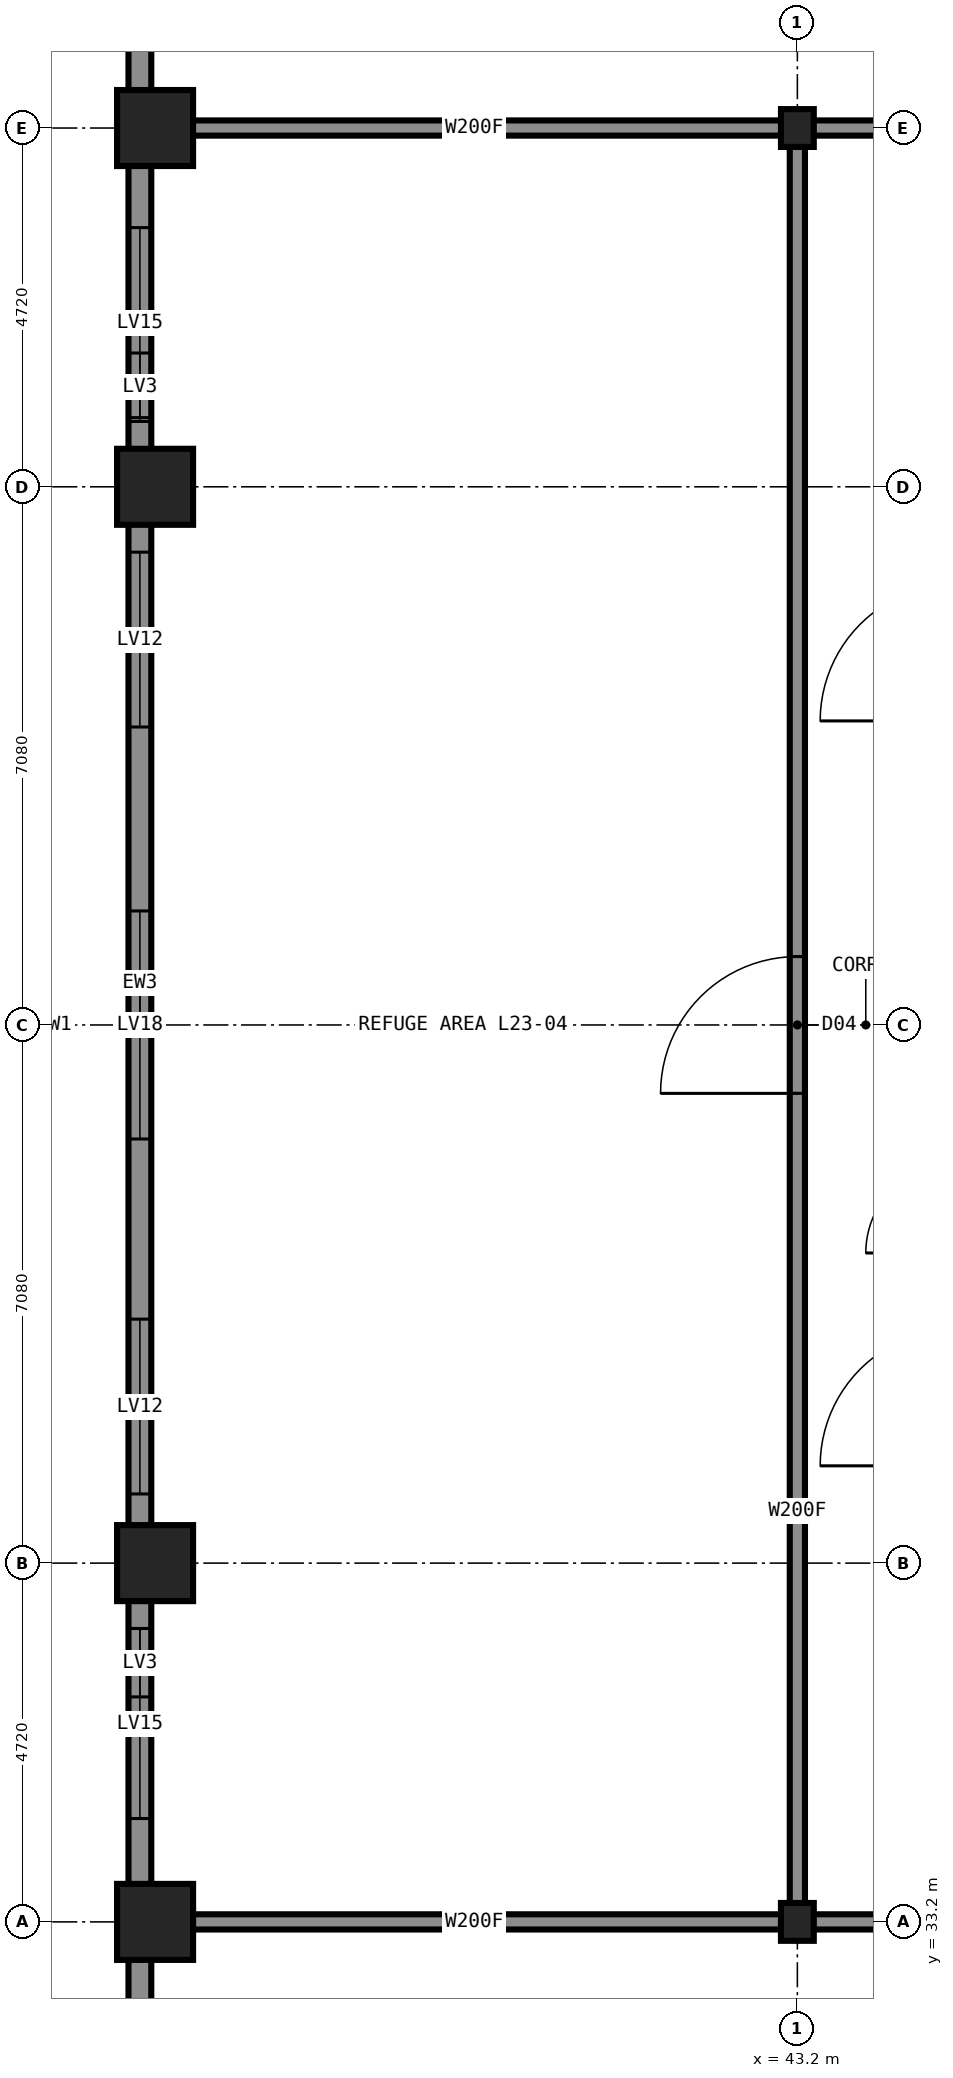
"""IFC4 building model, lengths in metres.
Left out: names, types, materials, properties, quantities, classifications, styles, units other than length and angle.
Written with IfcOpenShell. Run it as: python <this file> out.ifc"""

import sys

from ifc_helpers import new_model, si_unit, direction, frame, frame_2d, origin, origin_2d, place, context, subcontext, project, spatial, rectangle, hollow_rectangle, i_section, extrude, element, fill, save


model = new_model("IFC4")
c1 = context("Model", 3, precision=1e-05, world=origin(), true_north=direction((0.0, 1.0)))
c2 = subcontext(c1, "Body", "Model", "MODEL_VIEW")
j1 = project(units=[si_unit("LENGTHUNIT", "METRE"), si_unit("PLANEANGLEUNIT", "RADIAN")], contexts=[c1])
p1 = place(None, origin())
s1 = spatial("IfcSite", under=j1, at=p1, CompositionType="ELEMENT")
p2 = place(p1, origin())
s2 = spatial("IfcBuilding", under=s1, at=p2, CompositionType="ELEMENT")
p3 = place(p2, frame((0.0, 0.0, 88.0)))
s3 = spatial("IfcBuildingStorey", under=s2, at=p3, CompositionType="ELEMENT", Elevation=88.0)
for number, where, z_axis, x_axis in (
    (1, (34.75, 33.2, 0.0), (0.0, 0.0, 1.0), (1.0, 0.0, 0.0)),
    (2, (34.75, 37.92, 0.0), (0.0, 0.0, 1.0), (1.0, 0.0, 0.0)),
    (3, (34.75, 52.08, 0.0), (0.0, 0.0, 1.0), (1.0, 0.0, 0.0)),
    (4, (34.75, 56.8, 0.0), (0.0, 0.0, 1.0), (1.0, 0.0, 0.0)),
):
    element("IfcColumn", number, at=place(p3, frame(where, z_axis=z_axis, x_axis=x_axis)), inside=s3, PredefinedType="COLUMN", context=c2, shape_type="SweptSolid", body=[
        extrude(hollow_rectangle(XDim=1.0, YDim=1.0, WallThickness=0.06, at=origin_2d()), origin(), (0.0, 0.0, 1.0), 5.4),
    ])
for number, where, z_axis, x_axis in (
    (5, (43.2, 33.2, 0.0), (0.0, 0.0, 1.0), (1.0, 0.0, 0.0)),
    (6, (43.2, 56.8, 0.0), (0.0, 0.0, 1.0), (1.0, 0.0, 0.0)),
):
    element("IfcColumn", number, at=place(p3, frame(where, z_axis=z_axis, x_axis=x_axis)), inside=s3, PredefinedType="COLUMN", context=c2, shape_type="SweptSolid", body=[
        extrude(i_section(OverallWidth=0.432, OverallDepth=0.498, WebThickness=0.056, FlangeThickness=0.089, at=origin_2d()), origin(), (0.0, 0.0, 1.0), 5.4),
    ])
p4 = place(p3, frame((43.2, 33.2, 0.0), z_axis=(0.0, 0.0, 1.0), x_axis=(1.0, 0.0, 0.0)))
e7 = element("IfcWall", 7, at=p4, inside=s3, PredefinedType="PARTITIONING", context=c2, shape_type="SweptSolid", body=[
    extrude(rectangle(XDim=23.6, YDim=0.2, at=frame_2d((11.8, 0.0))), origin(), (0.0, 0.0, 1.0), 5.23),
])
p5 = place(p4, frame((5.3, 0.0, 0.0)))
e8 = element("IfcOpeningElement", 8, at=p5, cuts=e7, PredefinedType="OPENING", context=c2, shape_type="SweptSolid", body=[
    extrude(rectangle(XDim=1.0, YDim=2.1, at=frame_2d((0.5, 1.05))), frame((0.0, 0.11, 0.0), z_axis=(0.0, -1.0, 0.0), x_axis=(1.0, 0.0, 0.0)), (0.0, 0.0, 1.0), 0.22),
])
p6 = place(p3, frame((34.7, 33.2, 0.0), z_axis=(0.0, 0.0, 1.0), x_axis=(1.0, 0.0, 0.0)))
e9 = element("IfcWall", 9, at=p6, inside=s3, PredefinedType="PARTITIONING", context=c2, shape_type="SweptSolid", body=[
    extrude(rectangle(XDim=8.5, YDim=0.2, at=frame_2d((4.25, 0.0))), origin(), (0.0, 0.0, 1.0), 4.473),
])
p7 = place(p3, frame((43.2, 56.8, 0.0), z_axis=(0.0, 0.0, 1.0), x_axis=(1.0, 0.0, 0.0)))
e10 = element("IfcWall", 10, at=p7, inside=s3, PredefinedType="PARTITIONING", context=c2, shape_type="SweptSolid", body=[
    extrude(rectangle(XDim=23.6, YDim=0.2, at=frame_2d((11.8, 0.0))), origin(), (0.0, 0.0, 1.0), 5.23),
])
p8 = place(p7, frame((5.3, 0.0, 0.0)))
e11 = element("IfcOpeningElement", 11, at=p8, cuts=e10, PredefinedType="OPENING", context=c2, shape_type="SweptSolid", body=[
    extrude(rectangle(XDim=1.0, YDim=2.1, at=frame_2d((0.5, 1.05))), frame((0.0, 0.11, 0.0), z_axis=(0.0, -1.0, 0.0), x_axis=(1.0, 0.0, 0.0)), (0.0, 0.0, 1.0), 0.22),
])
p9 = place(p3, frame((34.7, 56.8, 0.0), z_axis=(0.0, 0.0, 1.0), x_axis=(1.0, 0.0, 0.0)))
e12 = element("IfcWall", 12, at=p9, inside=s3, PredefinedType="PARTITIONING", context=c2, shape_type="SweptSolid", body=[
    extrude(rectangle(XDim=8.5, YDim=0.2, at=frame_2d((4.25, 0.0))), origin(), (0.0, 0.0, 1.0), 4.473),
])
p10 = place(p3, frame((43.2, 33.2, 0.0), z_axis=(0.0, 0.0, 1.0), x_axis=(0.0, 1.0, 0.0)))
e13 = element("IfcWall", 13, at=p10, inside=s3, PredefinedType="PARTITIONING", context=c2, shape_type="SweptSolid", body=[
    extrude(rectangle(XDim=23.6, YDim=0.2, at=frame_2d((11.8, 0.0))), origin(), (0.0, 0.0, 1.0), 5.23),
])
p11 = place(p10, frame((10.9, 0.0, 0.0)))
e14 = element("IfcOpeningElement", 14, at=p11, cuts=e13, PredefinedType="OPENING", context=c2, shape_type="SweptSolid", body=[
    extrude(rectangle(XDim=1.8, YDim=2.2, at=frame_2d((0.9, 1.1))), frame((0.0, 0.11, 0.0), z_axis=(0.0, -1.0, 0.0), x_axis=(1.0, 0.0, 0.0)), (0.0, 0.0, 1.0), 0.22),
])
p12 = place(p3, frame((34.55, 60.1, 0.0), z_axis=(0.0, 0.0, 1.0), x_axis=(0.0, -1.0, 0.0)))
e15 = element("IfcWall", 15, at=p12, inside=s3, PredefinedType="SOLIDWALL", context=c2, shape_type="SweptSolid", body=[
    extrude(rectangle(XDim=30.2, YDim=0.3, at=frame_2d((15.1, 0.0))), origin(), (0.0, 0.0, 1.0), 4.43),
])
p13 = place(p12, frame((4.61, 0.0, 2.15)))
e16 = element("IfcOpeningElement", 16, at=p13, cuts=e15, PredefinedType="OPENING", context=c2, shape_type="SweptSolid", body=[
    extrude(rectangle(XDim=2.5, YDim=1.6, at=frame_2d((1.25, 0.8))), frame((0.0, 0.16, 0.0), z_axis=(0.0, -1.0, 0.0), x_axis=(1.0, 0.0, 0.0)), (0.0, 0.0, 1.0), 0.32),
])
p14 = place(p12, frame((8.88, 0.0, 2.3)))
e17 = element("IfcOpeningElement", 17, at=p14, cuts=e15, PredefinedType="OPENING", context=c2, shape_type="SweptSolid", body=[
    extrude(rectangle(XDim=2.3, YDim=1.5, at=frame_2d((1.15, 0.75))), frame((0.0, 0.16, 0.0), z_axis=(0.0, -1.0, 0.0), x_axis=(1.0, 0.0, 0.0)), (0.0, 0.0, 1.0), 0.32),
])
p15 = place(p12, frame((13.6, 0.0, 0.6)))
e18 = element("IfcOpeningElement", 18, at=p15, cuts=e15, PredefinedType="OPENING", context=c2, shape_type="SweptSolid", body=[
    extrude(rectangle(XDim=3.0, YDim=2.2, at=frame_2d((1.5, 1.1))), frame((0.0, 0.16, 0.0), z_axis=(0.0, -1.0, 0.0), x_axis=(1.0, 0.0, 0.0)), (0.0, 0.0, 1.0), 0.32),
])
p16 = place(p12, frame((18.97, 0.0, 2.3)))
e19 = element("IfcOpeningElement", 19, at=p16, cuts=e15, PredefinedType="OPENING", context=c2, shape_type="SweptSolid", body=[
    extrude(rectangle(XDim=2.3, YDim=1.5, at=frame_2d((1.15, 0.75))), frame((0.0, 0.16, 0.0), z_axis=(0.0, -1.0, 0.0), x_axis=(1.0, 0.0, 0.0)), (0.0, 0.0, 1.0), 0.32),
])
p17 = place(p12, frame((23.04, 0.0, 2.15)))
e20 = element("IfcOpeningElement", 20, at=p17, cuts=e15, PredefinedType="OPENING", context=c2, shape_type="SweptSolid", body=[
    extrude(rectangle(XDim=2.5, YDim=1.6, at=frame_2d((1.25, 0.8))), frame((0.0, 0.16, 0.0), z_axis=(0.0, -1.0, 0.0), x_axis=(1.0, 0.0, 0.0)), (0.0, 0.0, 1.0), 0.32),
])
p18 = place(p12, frame((6.26, 0.0, 0.6)))
e21 = element("IfcOpeningElement", 21, at=p18, cuts=e15, PredefinedType="OPENING", context=c2, shape_type="SweptSolid", body=[
    extrude(rectangle(XDim=0.9, YDim=1.5, at=frame_2d((0.45, 0.75))), frame((0.0, 0.16, 0.0), z_axis=(0.0, -1.0, 0.0), x_axis=(1.0, 0.0, 0.0)), (0.0, 0.0, 1.0), 0.32),
])
p19 = place(p12, frame((23.04, 0.0, 0.6)))
e22 = element("IfcOpeningElement", 22, at=p19, cuts=e15, PredefinedType="OPENING", context=c2, shape_type="SweptSolid", body=[
    extrude(rectangle(XDim=0.9, YDim=1.5, at=frame_2d((0.45, 0.75))), frame((0.0, 0.16, 0.0), z_axis=(0.0, -1.0, 0.0), x_axis=(1.0, 0.0, 0.0)), (0.0, 0.0, 1.0), 0.32),
])
p20 = place(p11, origin())
e23 = element("IfcDoor", 23, at=p20, inside=s3, OperationType="DOUBLE_DOOR_SINGLE_SWING", PredefinedType="DOOR", context=c2, shape_type="SweptSolid", body=[
    extrude(rectangle(XDim=1.8, YDim=2.2, at=frame_2d((0.9, 1.1))), frame((0.0, 0.025, 0.0), z_axis=(0.0, -1.0, 0.0), x_axis=(1.0, 0.0, 0.0)), (0.0, 0.0, 1.0), 0.05),
])
fill(e14, e23)
p21 = place(p13, origin())
e24 = element("IfcWindow", 24, at=p21, inside=s3, PartitioningType="SINGLE_PANEL", PredefinedType="USERDEFINED", context=c2, shape_type="SweptSolid", body=[
    extrude(rectangle(XDim=2.5, YDim=1.6, at=frame_2d((1.25, 0.8))), frame((0.0, 0.03, 0.0), z_axis=(0.0, -1.0, 0.0), x_axis=(1.0, 0.0, 0.0)), (0.0, 0.0, 1.0), 0.06),
])
fill(e16, e24)
p22 = place(p14, origin())
e25 = element("IfcWindow", 25, at=p22, inside=s3, PartitioningType="SINGLE_PANEL", PredefinedType="USERDEFINED", context=c2, shape_type="SweptSolid", body=[
    extrude(rectangle(XDim=2.3, YDim=1.5, at=frame_2d((1.15, 0.75))), frame((0.0, 0.03, 0.0), z_axis=(0.0, -1.0, 0.0), x_axis=(1.0, 0.0, 0.0)), (0.0, 0.0, 1.0), 0.06),
])
fill(e17, e25)
p23 = place(p15, origin())
e26 = element("IfcWindow", 26, at=p23, inside=s3, PartitioningType="SINGLE_PANEL", PredefinedType="USERDEFINED", context=c2, shape_type="SweptSolid", body=[
    extrude(rectangle(XDim=3.0, YDim=2.2, at=frame_2d((1.5, 1.1))), frame((0.0, 0.03, 0.0), z_axis=(0.0, -1.0, 0.0), x_axis=(1.0, 0.0, 0.0)), (0.0, 0.0, 1.0), 0.06),
])
fill(e18, e26)
p24 = place(p16, origin())
e27 = element("IfcWindow", 27, at=p24, inside=s3, PartitioningType="SINGLE_PANEL", PredefinedType="USERDEFINED", context=c2, shape_type="SweptSolid", body=[
    extrude(rectangle(XDim=2.3, YDim=1.5, at=frame_2d((1.15, 0.75))), frame((0.0, 0.03, 0.0), z_axis=(0.0, -1.0, 0.0), x_axis=(1.0, 0.0, 0.0)), (0.0, 0.0, 1.0), 0.06),
])
fill(e19, e27)
p25 = place(p17, origin())
e28 = element("IfcWindow", 28, at=p25, inside=s3, PartitioningType="SINGLE_PANEL", PredefinedType="USERDEFINED", context=c2, shape_type="SweptSolid", body=[
    extrude(rectangle(XDim=2.5, YDim=1.6, at=frame_2d((1.25, 0.8))), frame((0.0, 0.03, 0.0), z_axis=(0.0, -1.0, 0.0), x_axis=(1.0, 0.0, 0.0)), (0.0, 0.0, 1.0), 0.06),
])
fill(e20, e28)
p26 = place(p18, origin())
e29 = element("IfcWindow", 29, at=p26, inside=s3, PartitioningType="SINGLE_PANEL", PredefinedType="USERDEFINED", context=c2, shape_type="SweptSolid", body=[
    extrude(rectangle(XDim=0.9, YDim=1.5, at=frame_2d((0.45, 0.75))), frame((0.0, 0.03, 0.0), z_axis=(0.0, -1.0, 0.0), x_axis=(1.0, 0.0, 0.0)), (0.0, 0.0, 1.0), 0.06),
])
fill(e21, e29)
p27 = place(p19, origin())
e30 = element("IfcWindow", 30, at=p27, inside=s3, PartitioningType="SINGLE_PANEL", PredefinedType="USERDEFINED", context=c2, shape_type="SweptSolid", body=[
    extrude(rectangle(XDim=0.9, YDim=1.5, at=frame_2d((0.45, 0.75))), frame((0.0, 0.03, 0.0), z_axis=(0.0, -1.0, 0.0), x_axis=(1.0, 0.0, 0.0)), (0.0, 0.0, 1.0), 0.06),
])
fill(e22, e30)
save(model, sys.argv[1])
